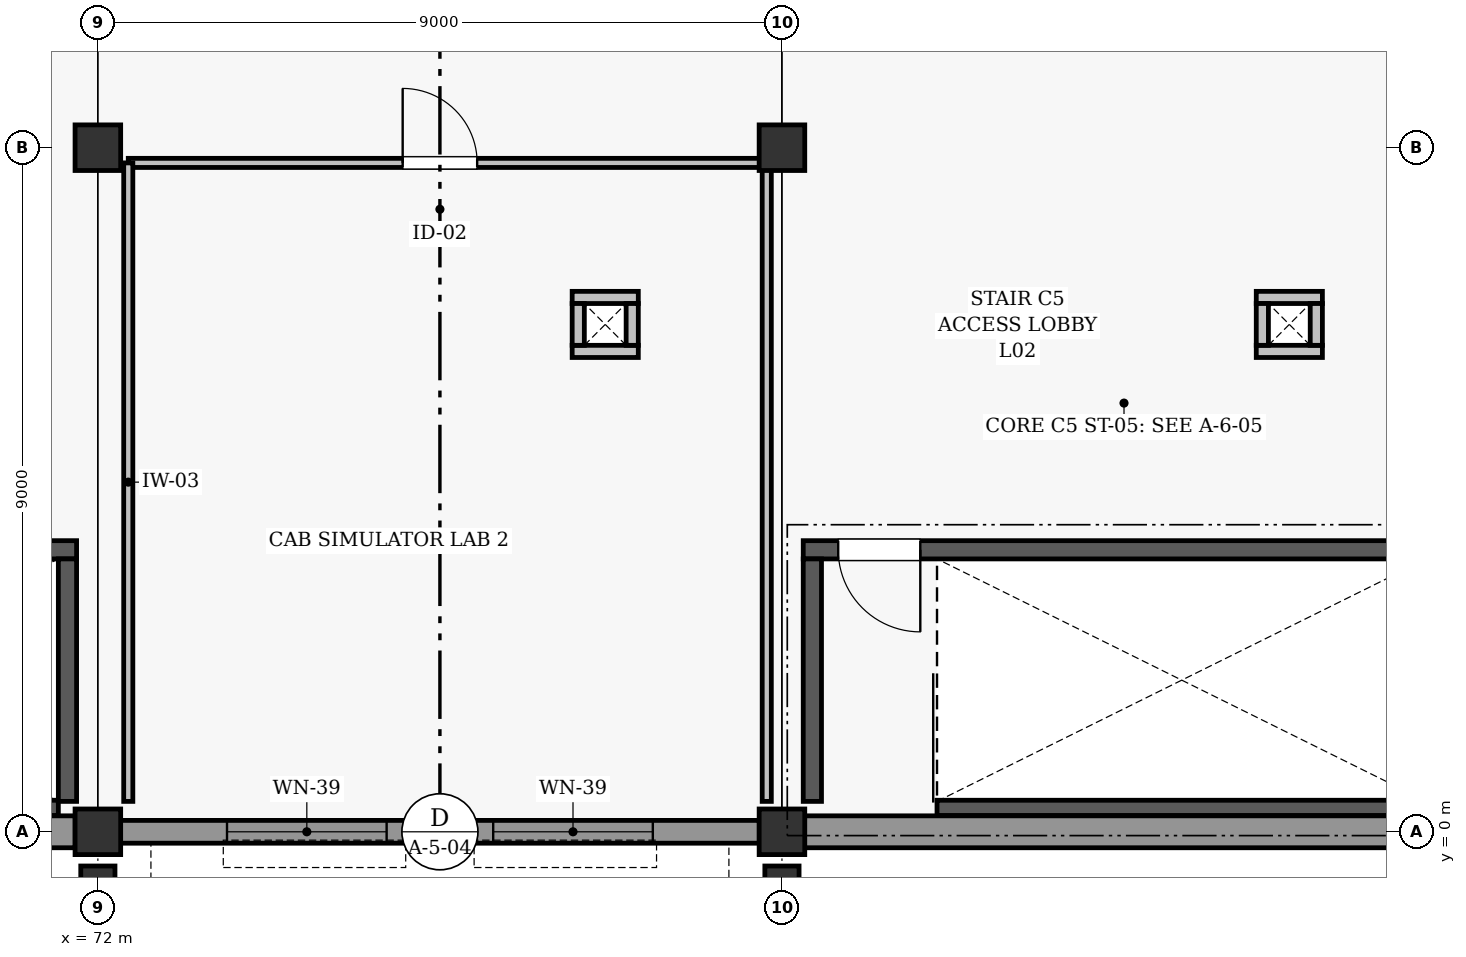
"""IFC4 building model, lengths in metres.
Left out: names, types, materials, properties, quantities, classifications, styles, units other than length and angle.
Written with IfcOpenShell. Run it as: python <this file> out.ifc"""

import sys

from ifc_helpers import new_model, si_unit, direction, frame, frame_2d, origin, origin_2d, place, context, subcontext, project, spatial, rectangle, extrude, element, fill, save


model = new_model("IFC4")
c1 = context("Model", 3, precision=1e-05, world=origin(), true_north=direction((0.0, 1.0)))
c2 = subcontext(c1, "Body", "Model", "MODEL_VIEW")
j1 = project(units=[si_unit("LENGTHUNIT", "METRE"), si_unit("PLANEANGLEUNIT", "RADIAN")], contexts=[c1])
p1 = place(None, origin())
s1 = spatial("IfcSite", under=j1, at=p1, CompositionType="ELEMENT")
p2 = place(p1, origin())
s2 = spatial("IfcBuilding", under=s1, at=p2, CompositionType="ELEMENT")
p3 = place(p2, frame((0.0, 0.0, 8.4)))
s3 = spatial("IfcBuildingStorey", under=s2, at=p3, CompositionType="ELEMENT", Elevation=8.4)
for number, where, z_axis, x_axis in (
    (1, (72.0, 0.0, 0.0), (0.0, 0.0, 1.0), (1.0, 0.0, 0.0)),
    (2, (72.0, 9.0, 0.0), (0.0, 0.0, 1.0), (1.0, 0.0, 0.0)),
    (3, (81.0, 0.0, 0.0), (0.0, 0.0, 1.0), (1.0, 0.0, 0.0)),
    (4, (81.0, 9.0, 0.0), (0.0, 0.0, 1.0), (1.0, 0.0, 0.0)),
):
    element("IfcColumn", number, at=place(p3, frame(where, z_axis=z_axis, x_axis=x_axis)), inside=s3, PredefinedType="COLUMN", context=c2, shape_type="SweptSolid", body=[
        extrude(rectangle(XDim=0.6, YDim=0.6, at=origin_2d()), origin(), (0.0, 0.0, 1.0), 3.6),
    ])
for number, where, z_axis, x_axis in (
    (5, (72.0, -0.75, 0.0), (0.0, 0.0, 1.0), (1.0, 0.0, 0.0)),
    (6, (81.0, -0.75, 0.0), (0.0, 0.0, 1.0), (1.0, 0.0, 0.0)),
):
    element("IfcColumn", number, at=place(p3, frame(where, z_axis=z_axis, x_axis=x_axis)), inside=s3, PredefinedType="PILASTER", context=c2, shape_type="SweptSolid", body=[
        extrude(rectangle(XDim=0.45, YDim=0.6, at=origin_2d()), origin(), (0.0, 0.0, 1.0), 3.6),
    ])
p4 = place(p3, frame((63.298, 0.0, 0.0), z_axis=(0.0, 0.0, 1.0), x_axis=(1.0, 0.0, 0.0)))
e7 = element("IfcWall", 7, at=p4, inside=s3, PredefinedType="SOLIDWALL", context=c2, shape_type="SweptSolid", body=[
    extrude(rectangle(XDim=8.404, YDim=0.42, at=frame_2d((4.202, 0.0))), origin(), (0.0, 0.0, 1.0), 2.862),
])
p5 = place(p3, frame((72.298, 0.0, 0.0), z_axis=(0.0, 0.0, 1.0), x_axis=(1.0, 0.0, 0.0)))
e8 = element("IfcWall", 8, at=p5, inside=s3, PredefinedType="SOLIDWALL", context=c2, shape_type="SweptSolid", body=[
    extrude(rectangle(XDim=8.404, YDim=0.3, at=frame_2d((4.202, 0.0))), origin(), (0.0, 0.0, 1.0), 2.862),
])
p6 = place(p5, frame((1.401, 0.0, 0.56)))
e9 = element("IfcOpeningElement", 9, at=p6, cuts=e8, PredefinedType="OPENING", context=c2, shape_type="SweptSolid", body=[
    extrude(rectangle(XDim=2.1, YDim=2.12, at=frame_2d((1.05, 1.06))), frame((0.0, 0.16, 0.0), z_axis=(0.0, -1.0, 0.0), x_axis=(1.0, 0.0, 0.0)), (0.0, 0.0, 1.0), 0.32),
])
p7 = place(p5, frame((4.903, 0.0, 0.56)))
e10 = element("IfcOpeningElement", 10, at=p7, cuts=e8, PredefinedType="OPENING", context=c2, shape_type="SweptSolid", body=[
    extrude(rectangle(XDim=2.1, YDim=2.12, at=frame_2d((1.05, 1.06))), frame((0.0, 0.16, 0.0), z_axis=(0.0, -1.0, 0.0), x_axis=(1.0, 0.0, 0.0)), (0.0, 0.0, 1.0), 0.32),
])
p8 = place(p3, frame((81.298, 0.0, 0.0), z_axis=(0.0, 0.0, 1.0), x_axis=(1.0, 0.0, 0.0)))
e11 = element("IfcWall", 11, at=p8, inside=s3, PredefinedType="SOLIDWALL", context=c2, shape_type="SweptSolid", body=[
    extrude(rectangle(XDim=8.404, YDim=0.42, at=frame_2d((4.202, 0.0))), origin(), (0.0, 0.0, 1.0), 2.902),
])
p9 = place(p3, frame((65.04, 0.315, 0.0), z_axis=(0.0, 0.0, 1.0), x_axis=(1.0, 0.0, 0.0)))
e12 = element("IfcWall", 12, at=p9, inside=s3, PredefinedType="SHEAR", context=c2, shape_type="SweptSolid", body=[
    extrude(rectangle(XDim=6.44, YDim=0.2, at=frame_2d((3.22, 0.0))), origin(), (0.0, 0.0, 1.0), 3.35),
])
p10 = place(p3, frame((63.28, 3.71, 0.0), z_axis=(0.0, 0.0, 1.0), x_axis=(1.0, 0.0, 0.0)))
e13 = element("IfcWall", 13, at=p10, inside=s3, PredefinedType="SHEAR", context=c2, shape_type="SweptSolid", body=[
    extrude(rectangle(XDim=8.44, YDim=0.24, at=frame_2d((4.22, 0.0))), origin(), (0.0, 0.0, 1.0), 3.35),
])
p11 = place(p10, frame((0.46, 0.0, 0.0)))
e14 = element("IfcOpeningElement", 14, at=p11, cuts=e13, PredefinedType="OPENING", context=c2, shape_type="SweptSolid", body=[
    extrude(rectangle(XDim=1.08, YDim=2.08, at=frame_2d((0.54, 1.04))), frame((0.0, 0.13, 0.0), z_axis=(0.0, -1.0, 0.0), x_axis=(1.0, 0.0, 0.0)), (0.0, 0.0, 1.0), 0.26),
])
p12 = place(p3, frame((71.6, 0.4, 0.0), z_axis=(0.0, 0.0, 1.0), x_axis=(0.0, 1.0, 0.0)))
e15 = element("IfcWall", 15, at=p12, inside=s3, PredefinedType="SHEAR", context=c2, shape_type="SweptSolid", body=[
    extrude(rectangle(XDim=3.19, YDim=0.24, at=frame_2d((1.595, 0.0))), origin(), (0.0, 0.0, 1.0), 3.35),
])
p13 = place(p3, frame((83.04, 0.315, 0.0), z_axis=(0.0, 0.0, 1.0), x_axis=(1.0, 0.0, 0.0)))
e16 = element("IfcWall", 16, at=p13, inside=s3, PredefinedType="SHEAR", context=c2, shape_type="SweptSolid", body=[
    extrude(rectangle(XDim=6.44, YDim=0.2, at=frame_2d((3.22, 0.0))), origin(), (0.0, 0.0, 1.0), 3.35),
])
p14 = place(p3, frame((81.28, 3.71, 0.0), z_axis=(0.0, 0.0, 1.0), x_axis=(1.0, 0.0, 0.0)))
e17 = element("IfcWall", 17, at=p14, inside=s3, PredefinedType="SHEAR", context=c2, shape_type="SweptSolid", body=[
    extrude(rectangle(XDim=8.44, YDim=0.24, at=frame_2d((4.22, 0.0))), origin(), (0.0, 0.0, 1.0), 3.35),
])
p15 = place(p14, frame((0.46, 0.0, 0.0)))
e18 = element("IfcOpeningElement", 18, at=p15, cuts=e17, PredefinedType="OPENING", context=c2, shape_type="SweptSolid", body=[
    extrude(rectangle(XDim=1.08, YDim=2.08, at=frame_2d((0.54, 1.04))), frame((0.0, 0.13, 0.0), z_axis=(0.0, -1.0, 0.0), x_axis=(1.0, 0.0, 0.0)), (0.0, 0.0, 1.0), 0.26),
])
p16 = place(p3, frame((81.4, 0.4, 0.0), z_axis=(0.0, 0.0, 1.0), x_axis=(0.0, 1.0, 0.0)))
e19 = element("IfcWall", 19, at=p16, inside=s3, PredefinedType="SHEAR", context=c2, shape_type="SweptSolid", body=[
    extrude(rectangle(XDim=3.19, YDim=0.24, at=frame_2d((1.595, 0.0))), origin(), (0.0, 0.0, 1.0), 3.35),
])
for number, where, z_axis, x_axis in (
    (20, (78.24, 6.32, 0.0), (0.0, 0.0, 1.0), (1.0, 0.0, 0.0)),
    (21, (78.24, 7.03, 0.0), (0.0, 0.0, 1.0), (1.0, 0.0, 0.0)),
):
    element("IfcWall", number, at=place(p3, frame(where, z_axis=z_axis, x_axis=x_axis)), inside=s3, PredefinedType="PARTITIONING", context=c2, shape_type="SweptSolid", body=[
        extrude(rectangle(XDim=0.87, YDim=0.16, at=frame_2d((0.435, 0.0))), origin(), (0.0, 0.0, 1.0), 3.35),
    ])
for number, where, z_axis, x_axis in (
    (22, (78.32, 6.4, 0.0), (0.0, 0.0, 1.0), (0.0, 1.0, 0.0)),
    (23, (79.03, 6.4, 0.0), (0.0, 0.0, 1.0), (0.0, 1.0, 0.0)),
):
    element("IfcWall", number, at=place(p3, frame(where, z_axis=z_axis, x_axis=x_axis)), inside=s3, PredefinedType="PARTITIONING", context=c2, shape_type="SweptSolid", body=[
        extrude(rectangle(XDim=0.55, YDim=0.16, at=frame_2d((0.275, 0.0))), origin(), (0.0, 0.0, 1.0), 3.35),
    ])
for number, where, z_axis, x_axis in (
    (24, (87.24, 6.32, 0.0), (0.0, 0.0, 1.0), (1.0, 0.0, 0.0)),
    (25, (87.24, 7.03, 0.0), (0.0, 0.0, 1.0), (1.0, 0.0, 0.0)),
):
    element("IfcWall", number, at=place(p3, frame(where, z_axis=z_axis, x_axis=x_axis)), inside=s3, PredefinedType="PARTITIONING", context=c2, shape_type="SweptSolid", body=[
        extrude(rectangle(XDim=0.87, YDim=0.16, at=frame_2d((0.435, 0.0))), origin(), (0.0, 0.0, 1.0), 3.35),
    ])
for number, where, z_axis, x_axis in (
    (26, (87.32, 6.4, 0.0), (0.0, 0.0, 1.0), (0.0, 1.0, 0.0)),
    (27, (88.03, 6.4, 0.0), (0.0, 0.0, 1.0), (0.0, 1.0, 0.0)),
):
    element("IfcWall", number, at=place(p3, frame(where, z_axis=z_axis, x_axis=x_axis)), inside=s3, PredefinedType="PARTITIONING", context=c2, shape_type="SweptSolid", body=[
        extrude(rectangle(XDim=0.55, YDim=0.16, at=frame_2d((0.275, 0.0))), origin(), (0.0, 0.0, 1.0), 3.35),
    ])
p17 = place(p3, frame((72.4, 8.8, 0.0), z_axis=(0.0, 0.0, 1.0), x_axis=(1.0, 0.0, 0.0)))
e28 = element("IfcWall", 28, at=p17, inside=s3, PredefinedType="PARTITIONING", context=c2, shape_type="SweptSolid", body=[
    extrude(rectangle(XDim=8.4, YDim=0.12, at=frame_2d((4.2, 0.0))), origin(), (0.0, 0.0, 1.0), 2.845),
])
p18 = place(p17, frame((3.61, 0.0, 0.0)))
e29 = element("IfcOpeningElement", 29, at=p18, cuts=e28, PredefinedType="OPENING", context=c2, shape_type="SweptSolid", body=[
    extrude(rectangle(XDim=0.98, YDim=2.08, at=frame_2d((0.49, 1.04))), frame((0.0, 0.07, 0.0), z_axis=(0.0, -1.0, 0.0), x_axis=(1.0, 0.0, 0.0)), (0.0, 0.0, 1.0), 0.14),
])
for number, where, z_axis, x_axis in (
    (30, (72.4, 0.4, 0.0), (0.0, 0.0, 1.0), (0.0, 1.0, 0.0)),
    (31, (80.8, 0.4, 0.0), (0.0, 0.0, 1.0), (0.0, 1.0, 0.0)),
):
    element("IfcWall", number, at=place(p3, frame(where, z_axis=z_axis, x_axis=x_axis)), inside=s3, PredefinedType="PARTITIONING", context=c2, shape_type="SweptSolid", body=[
        extrude(rectangle(XDim=8.4, YDim=0.12, at=frame_2d((4.2, 0.0))), origin(), (0.0, 0.0, 1.0), 2.845),
    ])
p19 = place(p6, origin())
e32 = element("IfcWindow", 32, at=p19, inside=s3, PartitioningType="SINGLE_PANEL", PredefinedType="WINDOW", context=c2, shape_type="SweptSolid", body=[
    extrude(rectangle(XDim=2.1, YDim=2.12, at=frame_2d((1.05, 1.06))), frame((0.0, 0.03, 0.0), z_axis=(0.0, -1.0, 0.0), x_axis=(1.0, 0.0, 0.0)), (0.0, 0.0, 1.0), 0.06),
])
fill(e9, e32)
p20 = place(p7, origin())
e33 = element("IfcWindow", 33, at=p20, inside=s3, PartitioningType="SINGLE_PANEL", PredefinedType="WINDOW", context=c2, shape_type="SweptSolid", body=[
    extrude(rectangle(XDim=2.1, YDim=2.12, at=frame_2d((1.05, 1.06))), frame((0.0, 0.03, 0.0), z_axis=(0.0, -1.0, 0.0), x_axis=(1.0, 0.0, 0.0)), (0.0, 0.0, 1.0), 0.06),
])
fill(e10, e33)
p21 = place(p15, frame((1.08, 0.0, 0.0), z_axis=(0.0, 0.0, 1.0), x_axis=(-1.0, 0.0, 0.0)))
e34 = element("IfcDoor", 34, at=p21, inside=s3, OperationType="SINGLE_SWING_RIGHT", PredefinedType="DOOR", context=c2, shape_type="SweptSolid", body=[
    extrude(rectangle(XDim=1.08, YDim=2.08, at=frame_2d((0.54, 1.04))), frame((0.0, 0.025, 0.0), z_axis=(0.0, -1.0, 0.0), x_axis=(1.0, 0.0, 0.0)), (0.0, 0.0, 1.0), 0.05),
])
fill(e18, e34)
p22 = place(p18, origin())
e35 = element("IfcDoor", 35, at=p22, inside=s3, OperationType="SINGLE_SWING_LEFT", PredefinedType="DOOR", context=c2, shape_type="SweptSolid", body=[
    extrude(rectangle(XDim=0.98, YDim=2.08, at=frame_2d((0.49, 1.04))), frame((0.0, 0.025, 0.0), z_axis=(0.0, -1.0, 0.0), x_axis=(1.0, 0.0, 0.0)), (0.0, 0.0, 1.0), 0.05),
])
fill(e29, e35)
save(model, sys.argv[1])
